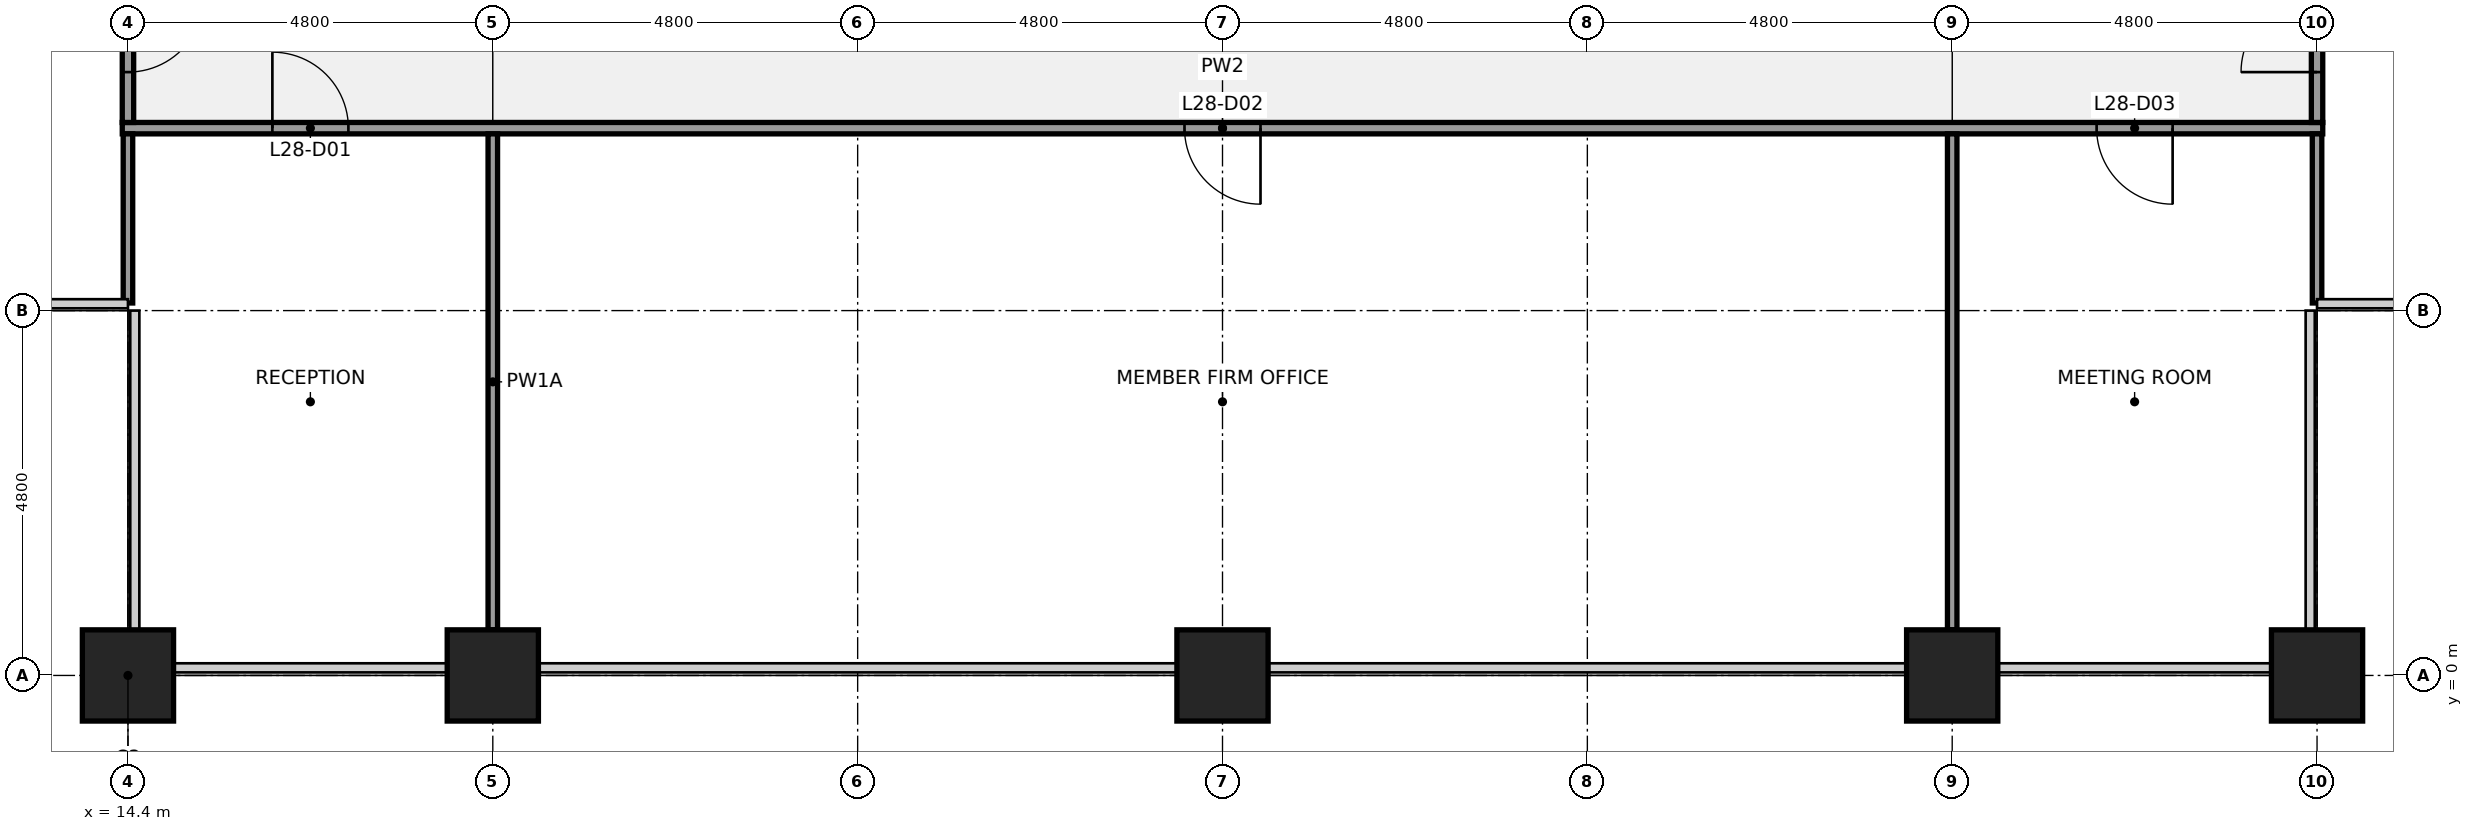
"""IFC4 building model, lengths in metres.
Left out: names, types, materials, properties, quantities, classifications, styles, units other than length and angle.
Written with IfcOpenShell. Run it as: python <this file> out.ifc"""

import sys

from ifc_helpers import new_model, si_unit, direction, frame, frame_2d, origin, origin_2d, place, context, subcontext, project, spatial, rectangle, extrude, element, fill, save


model = new_model("IFC4")
c1 = context("Model", 3, precision=1e-05, world=origin(), true_north=direction((0.0, 1.0)))
c2 = subcontext(c1, "Body", "Model", "MODEL_VIEW")
j1 = project(units=[si_unit("LENGTHUNIT", "METRE"), si_unit("PLANEANGLEUNIT", "RADIAN")], contexts=[c1])
p1 = place(None, origin())
s1 = spatial("IfcSite", under=j1, at=p1, CompositionType="ELEMENT")
p2 = place(p1, origin())
s2 = spatial("IfcBuilding", under=s1, at=p2, CompositionType="ELEMENT")
p3 = place(p2, frame((0.0, 0.0, 132.1)))
s3 = spatial("IfcBuildingStorey", under=s2, at=p3, CompositionType="ELEMENT", Elevation=132.1)
for number, where, z_axis, x_axis in (
    (1, (14.4, 0.0, 0.0), (0.0, 0.0, 1.0), (1.0, 0.0, 0.0)),
    (2, (19.2, 0.0, 0.0), (0.0, 0.0, 1.0), (1.0, 0.0, 0.0)),
    (3, (28.8, 0.0, 0.0), (0.0, 0.0, 1.0), (1.0, 0.0, 0.0)),
    (4, (38.4, 0.0, 0.0), (0.0, 0.0, 1.0), (1.0, 0.0, 0.0)),
    (5, (43.2, 0.0, 0.0), (0.0, 0.0, 1.0), (1.0, 0.0, 0.0)),
):
    element("IfcColumn", number, at=place(p3, frame(where, z_axis=z_axis, x_axis=x_axis)), inside=s3, PredefinedType="COLUMN", context=c2, shape_type="SweptSolid", body=[
        extrude(rectangle(XDim=1.2, YDim=1.2, at=origin_2d()), origin(), (0.0, 0.0, 1.0), 4.0),
    ])
p4 = place(p3, frame((14.325, 7.2, 0.0), z_axis=(0.0, 0.0, 1.0), x_axis=(1.0, 0.0, 0.0)))
e6 = element("IfcWall", 6, at=p4, inside=s3, PredefinedType="PARTITIONING", context=c2, shape_type="SweptSolid", body=[
    extrude(rectangle(XDim=28.95, YDim=0.15, at=frame_2d((14.475, 0.0))), origin(), (0.0, 0.0, 1.0), 2.936),
])
p5 = place(p4, frame((1.975, 0.0, 0.0)))
e7 = element("IfcOpeningElement", 7, at=p5, cuts=e6, PredefinedType="OPENING", context=c2, shape_type="SweptSolid", body=[
    extrude(rectangle(XDim=1.0, YDim=2.1, at=frame_2d((0.5, 1.05))), frame((0.0, 0.085, 0.0), z_axis=(0.0, -1.0, 0.0), x_axis=(1.0, 0.0, 0.0)), (0.0, 0.0, 1.0), 0.17),
])
p6 = place(p4, frame((13.975, 0.0, 0.0)))
e8 = element("IfcOpeningElement", 8, at=p6, cuts=e6, PredefinedType="OPENING", context=c2, shape_type="SweptSolid", body=[
    extrude(rectangle(XDim=1.0, YDim=2.1, at=frame_2d((0.5, 1.05))), frame((0.0, 0.085, 0.0), z_axis=(0.0, -1.0, 0.0), x_axis=(1.0, 0.0, 0.0)), (0.0, 0.0, 1.0), 0.17),
])
p7 = place(p4, frame((25.975, 0.0, 0.0)))
e9 = element("IfcOpeningElement", 9, at=p7, cuts=e6, PredefinedType="OPENING", context=c2, shape_type="SweptSolid", body=[
    extrude(rectangle(XDim=1.0, YDim=2.1, at=frame_2d((0.5, 1.05))), frame((0.0, 0.085, 0.0), z_axis=(0.0, -1.0, 0.0), x_axis=(1.0, 0.0, 0.0)), (0.0, 0.0, 1.0), 0.17),
])
p8 = place(p3, frame((14.4, 4.9, 0.0), z_axis=(0.0, 0.0, 1.0), x_axis=(0.0, 1.0, 0.0)))
e10 = element("IfcWall", 10, at=p8, inside=s3, PredefinedType="PARTITIONING", context=c2, shape_type="SweptSolid", body=[
    extrude(rectangle(XDim=2.225, YDim=0.125, at=frame_2d((1.113, 0.0))), origin(), (0.0, 0.0, 1.0), 2.936),
])
p9 = place(p3, frame((14.4, 7.275, 0.0), z_axis=(0.0, 0.0, 1.0), x_axis=(0.0, 1.0, 0.0)))
e11 = element("IfcWall", 11, at=p9, inside=s3, PredefinedType="PARTITIONING", context=c2, shape_type="SweptSolid", body=[
    extrude(rectangle(XDim=2.325, YDim=0.15, at=frame_2d((1.163, 0.0))), origin(), (0.0, 0.0, 1.0), 2.936),
])
p10 = place(p9, frame((0.663, 0.0, 0.0)))
e12 = element("IfcOpeningElement", 12, at=p10, cuts=e11, PredefinedType="OPENING", context=c2, shape_type="SweptSolid", body=[
    extrude(rectangle(XDim=1.0, YDim=2.1, at=frame_2d((0.5, 1.05))), frame((0.0, 0.085, 0.0), z_axis=(0.0, -1.0, 0.0), x_axis=(1.0, 0.0, 0.0)), (0.0, 0.0, 1.0), 0.17),
])
for number, where, z_axis, x_axis in (
    (13, (19.2, 0.6, 0.0), (0.0, 0.0, 1.0), (0.0, 1.0, 0.0)),
    (14, (38.4, 0.6, 0.0), (0.0, 0.0, 1.0), (0.0, 1.0, 0.0)),
):
    element("IfcWall", number, at=place(p3, frame(where, z_axis=z_axis, x_axis=x_axis)), inside=s3, PredefinedType="PARTITIONING", context=c2, shape_type="SweptSolid", body=[
        extrude(rectangle(XDim=6.525, YDim=0.125, at=frame_2d((3.262, 0.0))), origin(), (0.0, 0.0, 1.0), 2.936),
    ])
p11 = place(p3, frame((43.2, 4.9, 0.0), z_axis=(0.0, 0.0, 1.0), x_axis=(0.0, 1.0, 0.0)))
e15 = element("IfcWall", 15, at=p11, inside=s3, PredefinedType="PARTITIONING", context=c2, shape_type="SweptSolid", body=[
    extrude(rectangle(XDim=2.225, YDim=0.125, at=frame_2d((1.113, 0.0))), origin(), (0.0, 0.0, 1.0), 2.936),
])
p12 = place(p3, frame((43.2, 7.275, 0.0), z_axis=(0.0, 0.0, 1.0), x_axis=(0.0, 1.0, 0.0)))
e16 = element("IfcWall", 16, at=p12, inside=s3, PredefinedType="PARTITIONING", context=c2, shape_type="SweptSolid", body=[
    extrude(rectangle(XDim=2.325, YDim=0.15, at=frame_2d((1.163, 0.0))), origin(), (0.0, 0.0, 1.0), 2.936),
])
p13 = place(p12, frame((0.663, 0.0, 0.0)))
e17 = element("IfcOpeningElement", 17, at=p13, cuts=e16, PredefinedType="OPENING", context=c2, shape_type="SweptSolid", body=[
    extrude(rectangle(XDim=1.0, YDim=2.1, at=frame_2d((0.5, 1.05))), frame((0.0, 0.085, 0.0), z_axis=(0.0, -1.0, 0.0), x_axis=(1.0, 0.0, 0.0)), (0.0, 0.0, 1.0), 0.17),
])
for number, where, z_axis, x_axis in (
    (18, (14.4, -1.05, 0.0), (0.0, 0.0, 1.0), (1.0, 0.0, 0.0)),
    (19, (19.2, -1.05, 0.0), (0.0, 0.0, 1.0), (1.0, 0.0, 0.0)),
    (20, (38.4, -1.05, 0.0), (0.0, 0.0, 1.0), (1.0, 0.0, 0.0)),
    (21, (43.2, -1.05, 0.0), (0.0, 0.0, 1.0), (1.0, 0.0, 0.0)),
):
    element("IfcColumn", number, at=place(p3, frame(where, z_axis=z_axis, x_axis=x_axis)), inside=s3, PredefinedType="PILASTER", context=c2, shape_type="SweptSolid", body=[
        extrude(rectangle(XDim=3.6, YDim=0.9, at=origin_2d()), origin(), (0.0, 0.0, 1.0), 4.0),
    ])
p14 = place(p5, origin())
e22 = element("IfcDoor", 22, at=p14, inside=s3, OperationType="SINGLE_SWING_LEFT", PredefinedType="DOOR", context=c2, shape_type="SweptSolid", body=[
    extrude(rectangle(XDim=1.0, YDim=2.1, at=frame_2d((0.5, 1.05))), frame((0.0, 0.025, 0.0), z_axis=(0.0, -1.0, 0.0), x_axis=(1.0, 0.0, 0.0)), (0.0, 0.0, 1.0), 0.05),
])
fill(e7, e22)
p15 = place(p6, origin())
e23 = element("IfcDoor", 23, at=p15, inside=s3, OperationType="SINGLE_SWING_RIGHT", PredefinedType="DOOR", context=c2, shape_type="SweptSolid", body=[
    extrude(rectangle(XDim=1.0, YDim=2.1, at=frame_2d((0.5, 1.05))), frame((0.0, 0.025, 0.0), z_axis=(0.0, -1.0, 0.0), x_axis=(1.0, 0.0, 0.0)), (0.0, 0.0, 1.0), 0.05),
])
fill(e8, e23)
p16 = place(p7, origin())
e24 = element("IfcDoor", 24, at=p16, inside=s3, OperationType="SINGLE_SWING_RIGHT", PredefinedType="DOOR", context=c2, shape_type="SweptSolid", body=[
    extrude(rectangle(XDim=1.0, YDim=2.1, at=frame_2d((0.5, 1.05))), frame((0.0, 0.025, 0.0), z_axis=(0.0, -1.0, 0.0), x_axis=(1.0, 0.0, 0.0)), (0.0, 0.0, 1.0), 0.05),
])
fill(e9, e24)
p17 = place(p10, origin())
e25 = element("IfcDoor", 25, at=p17, inside=s3, OperationType="SINGLE_SWING_RIGHT", PredefinedType="DOOR", context=c2, shape_type="SweptSolid", body=[
    extrude(rectangle(XDim=1.0, YDim=2.1, at=frame_2d((0.5, 1.05))), frame((0.0, 0.025, 0.0), z_axis=(0.0, -1.0, 0.0), x_axis=(1.0, 0.0, 0.0)), (0.0, 0.0, 1.0), 0.05),
])
fill(e12, e25)
p18 = place(p13, origin())
e26 = element("IfcDoor", 26, at=p18, inside=s3, OperationType="SINGLE_SWING_LEFT", PredefinedType="DOOR", context=c2, shape_type="SweptSolid", body=[
    extrude(rectangle(XDim=1.0, YDim=2.1, at=frame_2d((0.5, 1.05))), frame((0.0, 0.025, 0.0), z_axis=(0.0, -1.0, 0.0), x_axis=(1.0, 0.0, 0.0)), (0.0, 0.0, 1.0), 0.05),
])
fill(e17, e26)
save(model, sys.argv[1])
